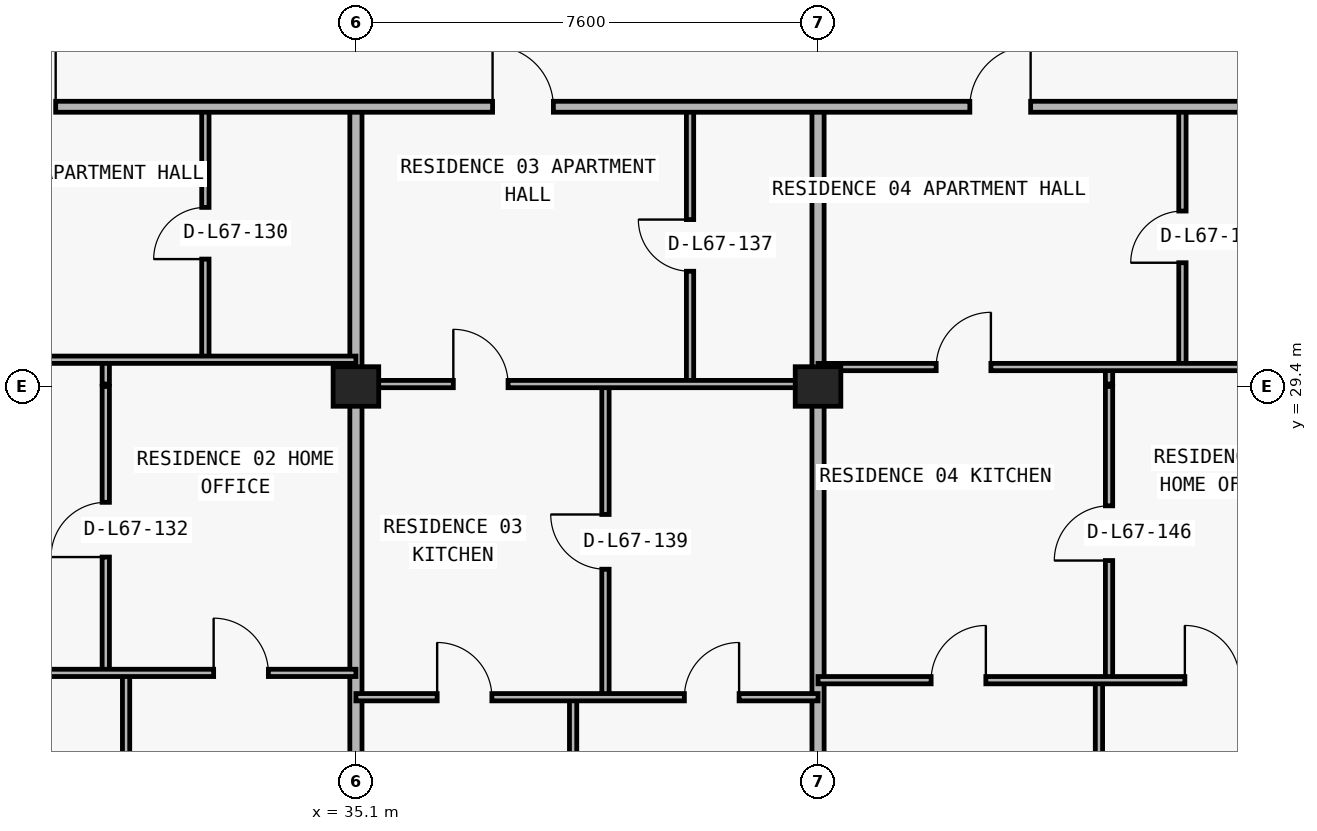
"""IFC4 building model, lengths in metres.
Left out: names, types, materials, properties, quantities, classifications, styles, units other than length and angle.
Written with IfcOpenShell. Run it as: python <this file> out.ifc"""

import sys

from ifc_helpers import new_model, si_unit, direction, frame, frame_2d, origin, origin_2d, place, context, subcontext, project, spatial, rectangle, extrude, element, fill, save


model = new_model("IFC4")
c1 = context("Model", 3, precision=1e-05, world=origin(), true_north=direction((0.0, 1.0)))
c2 = subcontext(c1, "Body", "Model", "MODEL_VIEW")
j1 = project(units=[si_unit("LENGTHUNIT", "METRE"), si_unit("PLANEANGLEUNIT", "RADIAN")], contexts=[c1])
p1 = place(None, origin())
s1 = spatial("IfcSite", under=j1, at=p1, CompositionType="ELEMENT")
p2 = place(p1, origin())
s2 = spatial("IfcBuilding", under=s1, at=p2, CompositionType="ELEMENT")
p3 = place(p2, frame((0.0, 0.0, 239.7)))
s3 = spatial("IfcBuildingStorey", under=s2, at=p3, CompositionType="ELEMENT", Elevation=239.7)
for number, where, z_axis, x_axis in (
    (1, (35.1, 29.4, 0.0), (0.0, 0.0, 1.0), (1.0, 0.0, 0.0)),
    (2, (42.7, 29.4, 0.0), (0.0, 0.0, 1.0), (1.0, 0.0, 0.0)),
):
    element("IfcColumn", number, at=place(p3, frame(where, z_axis=z_axis, x_axis=x_axis)), inside=s3, PredefinedType="COLUMN", context=c2, shape_type="SweptSolid", body=[
        extrude(rectangle(XDim=0.75, YDim=0.65, at=origin_2d()), origin(), (0.0, 0.0, 1.0), 3.05),
    ])
p4 = place(p3, frame((30.986, 24.69, 0.0), z_axis=(0.0, 0.0, 1.0), x_axis=(0.0, 1.0, 0.0)))
e3 = element("IfcWall", 3, at=p4, inside=s3, PredefinedType="PARTITIONING", context=c2, shape_type="SweptSolid", body=[
    extrude(rectangle(XDim=4.71, YDim=0.12, at=frame_2d((2.355, 0.0))), origin(), (0.0, 0.0, 1.0), 2.629),
])
p5 = place(p4, frame((1.905, 0.0, 0.0)))
e4 = element("IfcOpeningElement", 4, at=p5, cuts=e3, PredefinedType="OPENING", context=c2, shape_type="SweptSolid", body=[
    extrude(rectangle(XDim=0.9, YDim=2.15, at=frame_2d((0.45, 1.075))), frame((0.0, 0.07, 0.0), z_axis=(0.0, -1.0, 0.0), x_axis=(1.0, 0.0, 0.0)), (0.0, 0.0, 1.0), 0.14),
])
p6 = place(p3, frame((30.986, 29.44, 0.0), z_axis=(0.0, 0.0, 1.0), x_axis=(0.0, 1.0, 0.0)))
e5 = element("IfcWall", 5, at=p6, inside=s3, PredefinedType="PARTITIONING", context=c2, shape_type="SweptSolid", body=[
    extrude(rectangle(XDim=0.4, YDim=0.12, at=frame_2d((0.2, 0.0))), origin(), (0.0, 0.0, 1.0), 2.725),
])
p7 = place(p3, frame((31.32, 13.34, 0.0), z_axis=(0.0, 0.0, 1.0), x_axis=(0.0, 1.0, 0.0)))
e6 = element("IfcWall", 6, at=p7, inside=s3, PredefinedType="PARTITIONING", context=c2, shape_type="SweptSolid", body=[
    extrude(rectangle(XDim=11.35, YDim=0.12, at=frame_2d((5.675, 0.0))), origin(), (0.0, 0.0, 1.0), 3.05),
])
p8 = place(p3, frame((32.624, 29.84, 0.0), z_axis=(0.0, 0.0, 1.0), x_axis=(0.0, 1.0, 0.0)))
e7 = element("IfcWall", 7, at=p8, inside=s3, PredefinedType="PARTITIONING", context=c2, shape_type="SweptSolid", body=[
    extrude(rectangle(XDim=4.16, YDim=0.12, at=frame_2d((2.08, 0.0))), origin(), (0.0, 0.0, 1.0), 3.05),
])
p9 = place(p8, frame((1.655, 0.0, 0.0)))
e8 = element("IfcOpeningElement", 8, at=p9, cuts=e7, PredefinedType="OPENING", context=c2, shape_type="SweptSolid", body=[
    extrude(rectangle(XDim=0.85, YDim=2.1, at=frame_2d((0.425, 1.05))), frame((0.0, 0.07, 0.0), z_axis=(0.0, -1.0, 0.0), x_axis=(1.0, 0.0, 0.0)), (0.0, 0.0, 1.0), 0.14),
])
p10 = place(p3, frame((35.1, 13.34, 0.0), z_axis=(0.0, 0.0, 1.0), x_axis=(0.0, 1.0, 0.0)))
e9 = element("IfcWall", 9, at=p10, inside=s3, PredefinedType="PARTITIONING", context=c2, shape_type="SweptSolid", body=[
    extrude(rectangle(XDim=16.06, YDim=0.2, at=frame_2d((8.03, 0.0))), origin(), (0.0, 0.0, 1.0), 2.263),
])
p11 = place(p3, frame((35.1, 29.44, 0.0), z_axis=(0.0, 0.0, 1.0), x_axis=(0.0, 1.0, 0.0)))
e10 = element("IfcWall", 10, at=p11, inside=s3, PredefinedType="PARTITIONING", context=c2, shape_type="SweptSolid", body=[
    extrude(rectangle(XDim=4.56, YDim=0.2, at=frame_2d((2.28, 0.0))), origin(), (0.0, 0.0, 1.0), 2.263),
])
p12 = place(p3, frame((38.672, 13.34, 0.0), z_axis=(0.0, 0.0, 1.0), x_axis=(0.0, 1.0, 0.0)))
e11 = element("IfcWall", 11, at=p12, inside=s3, PredefinedType="PARTITIONING", context=c2, shape_type="SweptSolid", body=[
    extrude(rectangle(XDim=10.95, YDim=0.12, at=frame_2d((5.475, 0.0))), origin(), (0.0, 0.0, 1.0), 2.629),
])
p13 = place(p3, frame((39.204, 24.29, 0.0), z_axis=(0.0, 0.0, 1.0), x_axis=(0.0, 1.0, 0.0)))
e12 = element("IfcWall", 12, at=p13, inside=s3, PredefinedType="PARTITIONING", context=c2, shape_type="SweptSolid", body=[
    extrude(rectangle(XDim=5.11, YDim=0.12, at=frame_2d((2.555, 0.0))), origin(), (0.0, 0.0, 1.0), 3.05),
])
p14 = place(p13, frame((2.105, 0.0, 0.0)))
e13 = element("IfcOpeningElement", 13, at=p14, cuts=e12, PredefinedType="OPENING", context=c2, shape_type="SweptSolid", body=[
    extrude(rectangle(XDim=0.9, YDim=2.15, at=frame_2d((0.45, 1.075))), frame((0.0, 0.07, 0.0), z_axis=(0.0, -1.0, 0.0), x_axis=(1.0, 0.0, 0.0)), (0.0, 0.0, 1.0), 0.14),
])
p15 = place(p3, frame((40.595, 29.44, 0.0), z_axis=(0.0, 0.0, 1.0), x_axis=(0.0, 1.0, 0.0)))
e14 = element("IfcWall", 14, at=p15, inside=s3, PredefinedType="PARTITIONING", context=c2, shape_type="SweptSolid", body=[
    extrude(rectangle(XDim=4.56, YDim=0.12, at=frame_2d((2.28, 0.0))), origin(), (0.0, 0.0, 1.0), 3.05),
])
p16 = place(p15, frame((1.855, 0.0, 0.0)))
e15 = element("IfcOpeningElement", 15, at=p16, cuts=e14, PredefinedType="OPENING", context=c2, shape_type="SweptSolid", body=[
    extrude(rectangle(XDim=0.85, YDim=2.1, at=frame_2d((0.425, 1.05))), frame((0.0, 0.07, 0.0), z_axis=(0.0, -1.0, 0.0), x_axis=(1.0, 0.0, 0.0)), (0.0, 0.0, 1.0), 0.14),
])
p17 = place(p3, frame((42.7, 13.34, 0.0), z_axis=(0.0, 0.0, 1.0), x_axis=(0.0, 1.0, 0.0)))
e16 = element("IfcWall", 16, at=p17, inside=s3, PredefinedType="PARTITIONING", context=c2, shape_type="SweptSolid", body=[
    extrude(rectangle(XDim=16.06, YDim=0.2, at=frame_2d((8.03, 0.0))), origin(), (0.0, 0.0, 1.0), 2.263),
])
p18 = place(p3, frame((42.7, 29.44, 0.0), z_axis=(0.0, 0.0, 1.0), x_axis=(0.0, 1.0, 0.0)))
e17 = element("IfcWall", 17, at=p18, inside=s3, PredefinedType="PARTITIONING", context=c2, shape_type="SweptSolid", body=[
    extrude(rectangle(XDim=4.56, YDim=0.2, at=frame_2d((2.28, 0.0))), origin(), (0.0, 0.0, 1.0), 2.263),
])
p19 = place(p3, frame((47.32, 13.34, 0.0), z_axis=(0.0, 0.0, 1.0), x_axis=(0.0, 1.0, 0.0)))
e18 = element("IfcWall", 18, at=p19, inside=s3, PredefinedType="PARTITIONING", context=c2, shape_type="SweptSolid", body=[
    extrude(rectangle(XDim=11.23, YDim=0.12, at=frame_2d((5.615, 0.0))), origin(), (0.0, 0.0, 1.0), 3.05),
])
p20 = place(p3, frame((47.486, 24.575, 0.0), z_axis=(0.0, 0.0, 1.0), x_axis=(0.0, 1.0, 0.0)))
e19 = element("IfcWall", 19, at=p20, inside=s3, PredefinedType="PARTITIONING", context=c2, shape_type="SweptSolid", body=[
    extrude(rectangle(XDim=4.825, YDim=0.12, at=frame_2d((2.413, 0.0))), origin(), (0.0, 0.0, 1.0), 3.05),
])
p21 = place(p20, frame((1.962, 0.0, 0.0)))
e20 = element("IfcOpeningElement", 20, at=p21, cuts=e19, PredefinedType="OPENING", context=c2, shape_type="SweptSolid", body=[
    extrude(rectangle(XDim=0.9, YDim=2.15, at=frame_2d((0.45, 1.075))), frame((0.0, 0.07, 0.0), z_axis=(0.0, -1.0, 0.0), x_axis=(1.0, 0.0, 0.0)), (0.0, 0.0, 1.0), 0.14),
])
p22 = place(p3, frame((47.486, 29.44, 0.0), z_axis=(0.0, 0.0, 1.0), x_axis=(0.0, 1.0, 0.0)))
e21 = element("IfcWall", 21, at=p22, inside=s3, PredefinedType="PARTITIONING", context=c2, shape_type="SweptSolid", body=[
    extrude(rectangle(XDim=0.28, YDim=0.12, at=frame_2d((0.14, 0.0))), origin(), (0.0, 0.0, 1.0), 3.05),
])
p23 = place(p3, frame((48.693, 29.72, 0.0), z_axis=(0.0, 0.0, 1.0), x_axis=(0.0, 1.0, 0.0)))
e22 = element("IfcWall", 22, at=p23, inside=s3, PredefinedType="PARTITIONING", context=c2, shape_type="SweptSolid", body=[
    extrude(rectangle(XDim=4.28, YDim=0.12, at=frame_2d((2.14, 0.0))), origin(), (0.0, 0.0, 1.0), 3.05),
])
p24 = place(p23, frame((1.715, 0.0, 0.0)))
e23 = element("IfcOpeningElement", 23, at=p24, cuts=e22, PredefinedType="OPENING", context=c2, shape_type="SweptSolid", body=[
    extrude(rectangle(XDim=0.85, YDim=2.1, at=frame_2d((0.425, 1.05))), frame((0.0, 0.07, 0.0), z_axis=(0.0, -1.0, 0.0), x_axis=(1.0, 0.0, 0.0)), (0.0, 0.0, 1.0), 0.14),
])
p25 = place(p3, frame((35.1, 24.29, 0.0), z_axis=(0.0, 0.0, 1.0), x_axis=(1.0, 0.0, 0.0)))
e24 = element("IfcWall", 24, at=p25, inside=s3, PredefinedType="PARTITIONING", context=c2, shape_type="SweptSolid", body=[
    extrude(rectangle(XDim=7.6, YDim=0.12, at=frame_2d((3.8, 0.0))), origin(), (0.0, 0.0, 1.0), 3.05),
])
p26 = place(p25, frame((1.336, 0.0, 0.0)))
e25 = element("IfcOpeningElement", 25, at=p26, cuts=e24, PredefinedType="OPENING", context=c2, shape_type="SweptSolid", body=[
    extrude(rectangle(XDim=0.9, YDim=2.15, at=frame_2d((0.45, 1.075))), frame((0.0, 0.07, 0.0), z_axis=(0.0, -1.0, 0.0), x_axis=(1.0, 0.0, 0.0)), (0.0, 0.0, 1.0), 0.14),
])
p27 = place(p25, frame((5.402, 0.0, 0.0)))
e26 = element("IfcOpeningElement", 26, at=p27, cuts=e24, PredefinedType="OPENING", context=c2, shape_type="SweptSolid", body=[
    extrude(rectangle(XDim=0.9, YDim=2.15, at=frame_2d((0.45, 1.075))), frame((0.0, 0.07, 0.0), z_axis=(0.0, -1.0, 0.0), x_axis=(1.0, 0.0, 0.0)), (0.0, 0.0, 1.0), 0.14),
])
p28 = place(p3, frame((42.7, 24.57, 0.0), z_axis=(0.0, 0.0, 1.0), x_axis=(1.0, 0.0, 0.0)))
e27 = element("IfcWall", 27, at=p28, inside=s3, PredefinedType="PARTITIONING", context=c2, shape_type="SweptSolid", body=[
    extrude(rectangle(XDim=8.18, YDim=0.12, at=frame_2d((4.09, 0.0))), origin(), (0.0, 0.0, 1.0), 3.05),
])
p29 = place(p28, frame((1.86, 0.0, 0.0)))
e28 = element("IfcOpeningElement", 28, at=p29, cuts=e27, PredefinedType="OPENING", context=c2, shape_type="SweptSolid", body=[
    extrude(rectangle(XDim=0.9, YDim=2.15, at=frame_2d((0.45, 1.075))), frame((0.0, 0.07, 0.0), z_axis=(0.0, -1.0, 0.0), x_axis=(1.0, 0.0, 0.0)), (0.0, 0.0, 1.0), 0.14),
])
p30 = place(p28, frame((6.033, 0.0, 0.0)))
e29 = element("IfcOpeningElement", 29, at=p30, cuts=e27, PredefinedType="OPENING", context=c2, shape_type="SweptSolid", body=[
    extrude(rectangle(XDim=0.9, YDim=2.15, at=frame_2d((0.45, 1.075))), frame((0.0, 0.07, 0.0), z_axis=(0.0, -1.0, 0.0), x_axis=(1.0, 0.0, 0.0)), (0.0, 0.0, 1.0), 0.14),
])
p31 = place(p3, frame((26.92, 24.69, 0.0), z_axis=(0.0, 0.0, 1.0), x_axis=(1.0, 0.0, 0.0)))
e30 = element("IfcWall", 30, at=p31, inside=s3, PredefinedType="PARTITIONING", context=c2, shape_type="SweptSolid", body=[
    extrude(rectangle(XDim=8.18, YDim=0.12, at=frame_2d((4.09, 0.0))), origin(), (0.0, 0.0, 1.0), 3.05),
])
p32 = place(p31, frame((1.583, 0.0, 0.0)))
e31 = element("IfcOpeningElement", 31, at=p32, cuts=e30, PredefinedType="OPENING", context=c2, shape_type="SweptSolid", body=[
    extrude(rectangle(XDim=0.9, YDim=2.15, at=frame_2d((0.45, 1.075))), frame((0.0, 0.07, 0.0), z_axis=(0.0, -1.0, 0.0), x_axis=(1.0, 0.0, 0.0)), (0.0, 0.0, 1.0), 0.14),
])
p33 = place(p31, frame((5.84, 0.0, 0.0)))
e32 = element("IfcOpeningElement", 32, at=p33, cuts=e30, PredefinedType="OPENING", context=c2, shape_type="SweptSolid", body=[
    extrude(rectangle(XDim=0.9, YDim=2.15, at=frame_2d((0.45, 1.075))), frame((0.0, 0.07, 0.0), z_axis=(0.0, -1.0, 0.0), x_axis=(1.0, 0.0, 0.0)), (0.0, 0.0, 1.0), 0.14),
])
p34 = place(p3, frame((35.1, 29.44, 0.0), z_axis=(0.0, 0.0, 1.0), x_axis=(1.0, 0.0, 0.0)))
e33 = element("IfcWall", 33, at=p34, inside=s3, PredefinedType="PARTITIONING", context=c2, shape_type="SweptSolid", body=[
    extrude(rectangle(XDim=7.6, YDim=0.12, at=frame_2d((3.8, 0.0))), origin(), (0.0, 0.0, 1.0), 2.263),
])
p35 = place(p34, frame((1.602, 0.0, 0.0)))
e34 = element("IfcOpeningElement", 34, at=p35, cuts=e33, PredefinedType="OPENING", context=c2, shape_type="SweptSolid", body=[
    extrude(rectangle(XDim=0.9, YDim=2.15, at=frame_2d((0.45, 1.075))), frame((0.0, 0.07, 0.0), z_axis=(0.0, -1.0, 0.0), x_axis=(1.0, 0.0, 0.0)), (0.0, 0.0, 1.0), 0.14),
])
p36 = place(p3, frame((42.7, 29.72, 0.0), z_axis=(0.0, 0.0, 1.0), x_axis=(1.0, 0.0, 0.0)))
e35 = element("IfcWall", 35, at=p36, inside=s3, PredefinedType="PARTITIONING", context=c2, shape_type="SweptSolid", body=[
    extrude(rectangle(XDim=8.4, YDim=0.12, at=frame_2d((4.2, 0.0))), origin(), (0.0, 0.0, 1.0), 2.263),
])
p37 = place(p36, frame((1.943, 0.0, 0.0)))
e36 = element("IfcOpeningElement", 36, at=p37, cuts=e35, PredefinedType="OPENING", context=c2, shape_type="SweptSolid", body=[
    extrude(rectangle(XDim=0.9, YDim=2.15, at=frame_2d((0.45, 1.075))), frame((0.0, 0.07, 0.0), z_axis=(0.0, -1.0, 0.0), x_axis=(1.0, 0.0, 0.0)), (0.0, 0.0, 1.0), 0.14),
])
p38 = place(p3, frame((26.7, 29.84, 0.0), z_axis=(0.0, 0.0, 1.0), x_axis=(1.0, 0.0, 0.0)))
e37 = element("IfcWall", 37, at=p38, inside=s3, PredefinedType="PARTITIONING", context=c2, shape_type="SweptSolid", body=[
    extrude(rectangle(XDim=8.4, YDim=0.12, at=frame_2d((4.2, 0.0))), origin(), (0.0, 0.0, 1.0), 3.05),
])
p39 = place(p38, frame((1.693, 0.0, 0.0)))
e38 = element("IfcOpeningElement", 38, at=p39, cuts=e37, PredefinedType="OPENING", context=c2, shape_type="SweptSolid", body=[
    extrude(rectangle(XDim=0.9, YDim=2.15, at=frame_2d((0.45, 1.075))), frame((0.0, 0.07, 0.0), z_axis=(0.0, -1.0, 0.0), x_axis=(1.0, 0.0, 0.0)), (0.0, 0.0, 1.0), 0.14),
])
p40 = place(p3, frame((12.105, 34.0, 0.0), z_axis=(0.0, 0.0, 1.0), x_axis=(1.0, 0.0, 0.0)))
e39 = element("IfcWall", 39, at=p40, inside=s3, PredefinedType="PARTITIONING", context=c2, shape_type="SweptSolid", body=[
    extrude(rectangle(XDim=53.595, YDim=0.18, at=frame_2d((26.797, 0.0))), origin(), (0.0, 0.0, 1.0), 3.05),
])
p41 = place(p40, frame((1.607, 0.0, 0.0)))
e40 = element("IfcOpeningElement", 40, at=p41, cuts=e39, PredefinedType="OPENING", context=c2, shape_type="SweptSolid", body=[
    extrude(rectangle(XDim=1.0, YDim=2.2, at=frame_2d((0.5, 1.1))), frame((0.0, 0.1, 0.0), z_axis=(0.0, -1.0, 0.0), x_axis=(1.0, 0.0, 0.0)), (0.0, 0.0, 1.0), 0.2),
])
p42 = place(p40, frame((17.057, 0.0, 0.0)))
e41 = element("IfcOpeningElement", 41, at=p42, cuts=e39, PredefinedType="OPENING", context=c2, shape_type="SweptSolid", body=[
    extrude(rectangle(XDim=1.0, YDim=2.2, at=frame_2d((0.5, 1.1))), frame((0.0, 0.1, 0.0), z_axis=(0.0, -1.0, 0.0), x_axis=(1.0, 0.0, 0.0)), (0.0, 0.0, 1.0), 0.2),
])
p43 = place(p40, frame((25.242, 0.0, 0.0)))
e42 = element("IfcOpeningElement", 42, at=p43, cuts=e39, PredefinedType="OPENING", context=c2, shape_type="SweptSolid", body=[
    extrude(rectangle(XDim=1.0, YDim=2.2, at=frame_2d((0.5, 1.1))), frame((0.0, 0.1, 0.0), z_axis=(0.0, -1.0, 0.0), x_axis=(1.0, 0.0, 0.0)), (0.0, 0.0, 1.0), 0.2),
])
p44 = place(p40, frame((33.092, 0.0, 0.0)))
e43 = element("IfcOpeningElement", 43, at=p44, cuts=e39, PredefinedType="OPENING", context=c2, shape_type="SweptSolid", body=[
    extrude(rectangle(XDim=1.0, YDim=2.2, at=frame_2d((0.5, 1.1))), frame((0.0, 0.1, 0.0), z_axis=(0.0, -1.0, 0.0), x_axis=(1.0, 0.0, 0.0)), (0.0, 0.0, 1.0), 0.2),
])
p45 = place(p40, frame((41.705, 0.0, 0.0)))
e44 = element("IfcOpeningElement", 44, at=p45, cuts=e39, PredefinedType="OPENING", context=c2, shape_type="SweptSolid", body=[
    extrude(rectangle(XDim=1.0, YDim=2.2, at=frame_2d((0.5, 1.1))), frame((0.0, 0.1, 0.0), z_axis=(0.0, -1.0, 0.0), x_axis=(1.0, 0.0, 0.0)), (0.0, 0.0, 1.0), 0.2),
])
p46 = place(p42, origin())
e45 = element("IfcDoor", 45, at=p46, inside=s3, OperationType="SINGLE_SWING_RIGHT", PredefinedType="DOOR", context=c2, shape_type="SweptSolid", body=[
    extrude(rectangle(XDim=1.0, YDim=2.2, at=frame_2d((0.5, 1.1))), frame((0.0, 0.025, 0.0), z_axis=(0.0, -1.0, 0.0), x_axis=(1.0, 0.0, 0.0)), (0.0, 0.0, 1.0), 0.05),
])
fill(e41, e45)
p47 = place(p9, origin())
e46 = element("IfcDoor", 46, at=p47, inside=s3, OperationType="SINGLE_SWING_LEFT", PredefinedType="DOOR", context=c2, shape_type="SweptSolid", body=[
    extrude(rectangle(XDim=0.85, YDim=2.1, at=frame_2d((0.425, 1.05))), frame((0.0, 0.025, 0.0), z_axis=(0.0, -1.0, 0.0), x_axis=(1.0, 0.0, 0.0)), (0.0, 0.0, 1.0), 0.05),
])
fill(e8, e46)
p48 = place(p5, origin())
e47 = element("IfcDoor", 47, at=p48, inside=s3, OperationType="SINGLE_SWING_LEFT", PredefinedType="DOOR", context=c2, shape_type="SweptSolid", body=[
    extrude(rectangle(XDim=0.9, YDim=2.15, at=frame_2d((0.45, 1.075))), frame((0.0, 0.025, 0.0), z_axis=(0.0, -1.0, 0.0), x_axis=(1.0, 0.0, 0.0)), (0.0, 0.0, 1.0), 0.05),
])
fill(e4, e47)
p49 = place(p33, origin())
e48 = element("IfcDoor", 48, at=p49, inside=s3, OperationType="SINGLE_SWING_LEFT", PredefinedType="DOOR", context=c2, shape_type="SweptSolid", body=[
    extrude(rectangle(XDim=0.9, YDim=2.15, at=frame_2d((0.45, 1.075))), frame((0.0, 0.025, 0.0), z_axis=(0.0, -1.0, 0.0), x_axis=(1.0, 0.0, 0.0)), (0.0, 0.0, 1.0), 0.05),
])
fill(e32, e48)
p50 = place(p43, origin())
e49 = element("IfcDoor", 49, at=p50, inside=s3, OperationType="SINGLE_SWING_LEFT", PredefinedType="DOOR", context=c2, shape_type="SweptSolid", body=[
    extrude(rectangle(XDim=1.0, YDim=2.2, at=frame_2d((0.5, 1.1))), frame((0.0, 0.025, 0.0), z_axis=(0.0, -1.0, 0.0), x_axis=(1.0, 0.0, 0.0)), (0.0, 0.0, 1.0), 0.05),
])
fill(e42, e49)
p51 = place(p16, origin())
e50 = element("IfcDoor", 50, at=p51, inside=s3, OperationType="SINGLE_SWING_RIGHT", PredefinedType="DOOR", context=c2, shape_type="SweptSolid", body=[
    extrude(rectangle(XDim=0.85, YDim=2.1, at=frame_2d((0.425, 1.05))), frame((0.0, 0.025, 0.0), z_axis=(0.0, -1.0, 0.0), x_axis=(1.0, 0.0, 0.0)), (0.0, 0.0, 1.0), 0.05),
])
fill(e15, e50)
p52 = place(p35, origin())
e51 = element("IfcDoor", 51, at=p52, inside=s3, OperationType="SINGLE_SWING_LEFT", PredefinedType="DOOR", context=c2, shape_type="SweptSolid", body=[
    extrude(rectangle(XDim=0.9, YDim=2.15, at=frame_2d((0.45, 1.075))), frame((0.0, 0.025, 0.0), z_axis=(0.0, -1.0, 0.0), x_axis=(1.0, 0.0, 0.0)), (0.0, 0.0, 1.0), 0.05),
])
fill(e34, e51)
p53 = place(p14, origin())
e52 = element("IfcDoor", 52, at=p53, inside=s3, OperationType="SINGLE_SWING_RIGHT", PredefinedType="DOOR", context=c2, shape_type="SweptSolid", body=[
    extrude(rectangle(XDim=0.9, YDim=2.15, at=frame_2d((0.45, 1.075))), frame((0.0, 0.025, 0.0), z_axis=(0.0, -1.0, 0.0), x_axis=(1.0, 0.0, 0.0)), (0.0, 0.0, 1.0), 0.05),
])
fill(e13, e52)
p54 = place(p26, origin())
e53 = element("IfcDoor", 53, at=p54, inside=s3, OperationType="SINGLE_SWING_LEFT", PredefinedType="DOOR", context=c2, shape_type="SweptSolid", body=[
    extrude(rectangle(XDim=0.9, YDim=2.15, at=frame_2d((0.45, 1.075))), frame((0.0, 0.025, 0.0), z_axis=(0.0, -1.0, 0.0), x_axis=(1.0, 0.0, 0.0)), (0.0, 0.0, 1.0), 0.05),
])
fill(e25, e53)
p55 = place(p27, origin())
e54 = element("IfcDoor", 54, at=p55, inside=s3, OperationType="SINGLE_SWING_RIGHT", PredefinedType="DOOR", context=c2, shape_type="SweptSolid", body=[
    extrude(rectangle(XDim=0.9, YDim=2.15, at=frame_2d((0.45, 1.075))), frame((0.0, 0.025, 0.0), z_axis=(0.0, -1.0, 0.0), x_axis=(1.0, 0.0, 0.0)), (0.0, 0.0, 1.0), 0.05),
])
fill(e26, e54)
p56 = place(p44, origin())
e55 = element("IfcDoor", 55, at=p56, inside=s3, OperationType="SINGLE_SWING_RIGHT", PredefinedType="DOOR", context=c2, shape_type="SweptSolid", body=[
    extrude(rectangle(XDim=1.0, YDim=2.2, at=frame_2d((0.5, 1.1))), frame((0.0, 0.025, 0.0), z_axis=(0.0, -1.0, 0.0), x_axis=(1.0, 0.0, 0.0)), (0.0, 0.0, 1.0), 0.05),
])
fill(e43, e55)
p57 = place(p24, origin())
e56 = element("IfcDoor", 56, at=p57, inside=s3, OperationType="SINGLE_SWING_LEFT", PredefinedType="DOOR", context=c2, shape_type="SweptSolid", body=[
    extrude(rectangle(XDim=0.85, YDim=2.1, at=frame_2d((0.425, 1.05))), frame((0.0, 0.025, 0.0), z_axis=(0.0, -1.0, 0.0), x_axis=(1.0, 0.0, 0.0)), (0.0, 0.0, 1.0), 0.05),
])
fill(e23, e56)
p58 = place(p37, origin())
e57 = element("IfcDoor", 57, at=p58, inside=s3, OperationType="SINGLE_SWING_RIGHT", PredefinedType="DOOR", context=c2, shape_type="SweptSolid", body=[
    extrude(rectangle(XDim=0.9, YDim=2.15, at=frame_2d((0.45, 1.075))), frame((0.0, 0.025, 0.0), z_axis=(0.0, -1.0, 0.0), x_axis=(1.0, 0.0, 0.0)), (0.0, 0.0, 1.0), 0.05),
])
fill(e36, e57)
p59 = place(p21, origin())
e58 = element("IfcDoor", 58, at=p59, inside=s3, OperationType="SINGLE_SWING_LEFT", PredefinedType="DOOR", context=c2, shape_type="SweptSolid", body=[
    extrude(rectangle(XDim=0.9, YDim=2.15, at=frame_2d((0.45, 1.075))), frame((0.0, 0.025, 0.0), z_axis=(0.0, -1.0, 0.0), x_axis=(1.0, 0.0, 0.0)), (0.0, 0.0, 1.0), 0.05),
])
fill(e20, e58)
p60 = place(p29, origin())
e59 = element("IfcDoor", 59, at=p60, inside=s3, OperationType="SINGLE_SWING_RIGHT", PredefinedType="DOOR", context=c2, shape_type="SweptSolid", body=[
    extrude(rectangle(XDim=0.9, YDim=2.15, at=frame_2d((0.45, 1.075))), frame((0.0, 0.025, 0.0), z_axis=(0.0, -1.0, 0.0), x_axis=(1.0, 0.0, 0.0)), (0.0, 0.0, 1.0), 0.05),
])
fill(e28, e59)
p61 = place(p30, origin())
e60 = element("IfcDoor", 60, at=p61, inside=s3, OperationType="SINGLE_SWING_LEFT", PredefinedType="DOOR", context=c2, shape_type="SweptSolid", body=[
    extrude(rectangle(XDim=0.9, YDim=2.15, at=frame_2d((0.45, 1.075))), frame((0.0, 0.025, 0.0), z_axis=(0.0, -1.0, 0.0), x_axis=(1.0, 0.0, 0.0)), (0.0, 0.0, 1.0), 0.05),
])
fill(e29, e60)
save(model, sys.argv[1])
